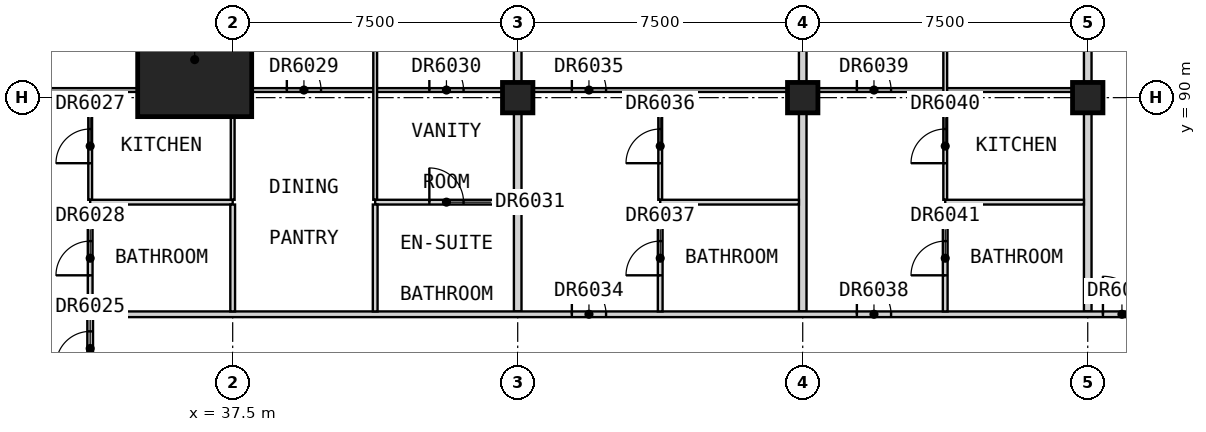
"""IFC4 building model, lengths in metres.
Left out: names, types, materials, properties, quantities, classifications, styles, units other than length and angle.
Written with IfcOpenShell. Run it as: python <this file> out.ifc"""

import sys

from ifc_helpers import new_model, si_unit, direction, frame, frame_2d, origin, origin_2d, place, context, subcontext, project, spatial, rectangle, extrude, element, fill, save


model = new_model("IFC4")
c1 = context("Model", 3, precision=1e-05, world=origin(), true_north=direction((0.0, 1.0)))
c2 = subcontext(c1, "Body", "Model", "MODEL_VIEW")
j1 = project(units=[si_unit("LENGTHUNIT", "METRE"), si_unit("PLANEANGLEUNIT", "RADIAN")], contexts=[c1])
p1 = place(None, origin())
s1 = spatial("IfcSite", under=j1, at=p1, CompositionType="ELEMENT")
p2 = place(p1, origin())
s2 = spatial("IfcBuilding", under=s1, at=p2, CompositionType="ELEMENT")
p3 = place(p2, frame((0.0, 0.0, 254.7)))
s3 = spatial("IfcBuildingStorey", under=s2, at=p3, CompositionType="ELEMENT", Elevation=254.7)
for number, where, z_axis, x_axis in (
    (1, (45.0, 90.0, 0.0), (0.0, 0.0, 1.0), (1.0, 0.0, 0.0)),
    (2, (52.5, 90.0, 0.0), (0.0, 0.0, 1.0), (1.0, 0.0, 0.0)),
    (3, (60.0, 90.0, 0.0), (0.0, 0.0, 1.0), (1.0, 0.0, 0.0)),
):
    element("IfcColumn", number, at=place(p3, frame(where, z_axis=z_axis, x_axis=x_axis)), inside=s3, PredefinedType="COLUMN", context=c2, shape_type="SweptSolid", body=[
        extrude(rectangle(XDim=0.8, YDim=0.8, at=origin_2d()), origin(), (0.0, 0.0, 1.0), 3.5),
    ])
p4 = place(p3, frame((36.5, 91.0, 0.0), z_axis=(0.0, 0.0, 1.0), x_axis=(1.0, 0.0, 0.0)))
e4 = element("IfcColumn", 4, at=p4, inside=s3, PredefinedType="COLUMN", context=c2, shape_type="SweptSolid", body=[
    extrude(rectangle(XDim=3.0, YDim=3.0, at=origin_2d()), origin(), (0.0, 0.0, 1.0), 3.5),
])
for number, where, z_axis, x_axis in (
    (5, (45.0, 84.375, 0.0), (0.0, 0.0, 1.0), (0.0, 1.0, 0.0)),
    (6, (52.5, 84.375, 0.0), (0.0, 0.0, 1.0), (0.0, 1.0, 0.0)),
    (7, (60.0, 84.375, 0.0), (0.0, 0.0, 1.0), (0.0, 1.0, 0.0)),
):
    element("IfcWall", number, at=place(p3, frame(where, z_axis=z_axis, x_axis=x_axis)), inside=s3, PredefinedType="PARTITIONING", context=c2, shape_type="SweptSolid", body=[
        extrude(rectangle(XDim=13.125, YDim=0.2, at=frame_2d((6.562, 0.0))), origin(), (0.0, 0.0, 1.0), 3.1),
    ])
p5 = place(p3, frame((33.75, 84.3, 0.0), z_axis=(0.0, 0.0, 1.0), x_axis=(1.0, 0.0, 0.0)))
e8 = element("IfcWall", 8, at=p5, inside=s3, PredefinedType="PARTITIONING", context=c2, shape_type="SweptSolid", body=[
    extrude(rectangle(XDim=28.05, YDim=0.15, at=frame_2d((14.025, 0.0))), origin(), (0.0, 0.0, 1.0), 3.1),
])
p6 = place(p5, frame((12.675, 0.0, 0.0)))
e9 = element("IfcOpeningElement", 9, at=p6, cuts=e8, PredefinedType="OPENING", context=c2, shape_type="SweptSolid", body=[
    extrude(rectangle(XDim=0.9, YDim=2.1, at=frame_2d((0.45, 1.05))), frame((0.0, 0.085, 0.0), z_axis=(0.0, -1.0, 0.0), x_axis=(1.0, 0.0, 0.0)), (0.0, 0.0, 1.0), 0.17),
])
p7 = place(p5, frame((20.175, 0.0, 0.0)))
e10 = element("IfcOpeningElement", 10, at=p7, cuts=e8, PredefinedType="OPENING", context=c2, shape_type="SweptSolid", body=[
    extrude(rectangle(XDim=0.9, YDim=2.1, at=frame_2d((0.45, 1.05))), frame((0.0, 0.085, 0.0), z_axis=(0.0, -1.0, 0.0), x_axis=(1.0, 0.0, 0.0)), (0.0, 0.0, 1.0), 0.17),
])
p8 = place(p5, frame((26.65, 0.0, 0.0)))
e11 = element("IfcOpeningElement", 11, at=p8, cuts=e8, PredefinedType="OPENING", context=c2, shape_type="SweptSolid", body=[
    extrude(rectangle(XDim=1.0, YDim=2.1, at=frame_2d((0.5, 1.05))), frame((0.0, 0.085, 0.0), z_axis=(0.0, -1.0, 0.0), x_axis=(1.0, 0.0, 0.0)), (0.0, 0.0, 1.0), 0.17),
])
p9 = place(p3, frame((33.75, 82.5, 0.0), z_axis=(0.0, 0.0, 1.0), x_axis=(0.0, 1.0, 0.0)))
e12 = element("IfcWall", 12, at=p9, inside=s3, PredefinedType="PARTITIONING", context=c2, shape_type="SweptSolid", body=[
    extrude(rectangle(XDim=1.725, YDim=0.15, at=frame_2d((0.863, 0.0))), origin(), (0.0, 0.0, 1.0), 3.1),
])
p10 = place(p9, frame((0.45, 0.0, 0.0)))
e13 = element("IfcOpeningElement", 13, at=p10, cuts=e12, PredefinedType="OPENING", context=c2, shape_type="SweptSolid", body=[
    extrude(rectangle(XDim=0.9, YDim=2.1, at=frame_2d((0.45, 1.05))), frame((0.0, 0.085, 0.0), z_axis=(0.0, -1.0, 0.0), x_axis=(1.0, 0.0, 0.0)), (0.0, 0.0, 1.0), 0.17),
])
p11 = place(p3, frame((30.0, 90.2, 0.0), z_axis=(0.0, 0.0, 1.0), x_axis=(1.0, 0.0, 0.0)))
e14 = element("IfcWall", 14, at=p11, inside=s3, PredefinedType="PARTITIONING", context=c2, shape_type="SweptSolid", body=[
    extrude(rectangle(XDim=29.9, YDim=0.1, at=frame_2d((14.95, 0.0))), origin(), (0.0, 0.0, 1.0), 2.75),
])
p12 = place(p11, frame((1.425, 0.0, 0.0)))
e15 = element("IfcOpeningElement", 15, at=p12, cuts=e14, PredefinedType="OPENING", context=c2, shape_type="SweptSolid", body=[
    extrude(rectangle(XDim=0.9, YDim=2.1, at=frame_2d((0.45, 1.05))), frame((0.0, 0.06, 0.0), z_axis=(0.0, -1.0, 0.0), x_axis=(1.0, 0.0, 0.0)), (0.0, 0.0, 1.0), 0.12),
])
p13 = place(p11, frame((8.925, 0.0, 0.0)))
e16 = element("IfcOpeningElement", 16, at=p13, cuts=e14, PredefinedType="OPENING", context=c2, shape_type="SweptSolid", body=[
    extrude(rectangle(XDim=0.9, YDim=2.1, at=frame_2d((0.45, 1.05))), frame((0.0, 0.06, 0.0), z_axis=(0.0, -1.0, 0.0), x_axis=(1.0, 0.0, 0.0)), (0.0, 0.0, 1.0), 0.12),
])
p14 = place(p11, frame((12.675, 0.0, 0.0)))
e17 = element("IfcOpeningElement", 17, at=p14, cuts=e14, PredefinedType="OPENING", context=c2, shape_type="SweptSolid", body=[
    extrude(rectangle(XDim=0.9, YDim=2.1, at=frame_2d((0.45, 1.05))), frame((0.0, 0.06, 0.0), z_axis=(0.0, -1.0, 0.0), x_axis=(1.0, 0.0, 0.0)), (0.0, 0.0, 1.0), 0.12),
])
p15 = place(p11, frame((16.425, 0.0, 0.0)))
e18 = element("IfcOpeningElement", 18, at=p15, cuts=e14, PredefinedType="OPENING", context=c2, shape_type="SweptSolid", body=[
    extrude(rectangle(XDim=0.9, YDim=2.1, at=frame_2d((0.45, 1.05))), frame((0.0, 0.06, 0.0), z_axis=(0.0, -1.0, 0.0), x_axis=(1.0, 0.0, 0.0)), (0.0, 0.0, 1.0), 0.12),
])
p16 = place(p11, frame((23.925, 0.0, 0.0)))
e19 = element("IfcOpeningElement", 19, at=p16, cuts=e14, PredefinedType="OPENING", context=c2, shape_type="SweptSolid", body=[
    extrude(rectangle(XDim=0.9, YDim=2.1, at=frame_2d((0.45, 1.05))), frame((0.0, 0.06, 0.0), z_axis=(0.0, -1.0, 0.0), x_axis=(1.0, 0.0, 0.0)), (0.0, 0.0, 1.0), 0.12),
])
p17 = place(p3, frame((33.75, 87.312, 0.0), z_axis=(0.0, 0.0, 1.0), x_axis=(0.0, 1.0, 0.0)))
e20 = element("IfcWall", 20, at=p17, inside=s3, PredefinedType="PARTITIONING", context=c2, shape_type="SweptSolid", body=[
    extrude(rectangle(XDim=2.837, YDim=0.1, at=frame_2d((1.419, 0.0))), origin(), (0.0, 0.0, 1.0), 3.1),
])
p18 = place(p17, frame((0.962, 0.0, 0.0)))
e21 = element("IfcOpeningElement", 21, at=p18, cuts=e20, PredefinedType="OPENING", context=c2, shape_type="SweptSolid", body=[
    extrude(rectangle(XDim=0.9, YDim=2.1, at=frame_2d((0.45, 1.05))), frame((0.0, 0.06, 0.0), z_axis=(0.0, -1.0, 0.0), x_axis=(1.0, 0.0, 0.0)), (0.0, 0.0, 1.0), 0.12),
])
p19 = place(p3, frame((37.5, 87.312, 0.0), z_axis=(0.0, 0.0, 1.0), x_axis=(0.0, 1.0, 0.0)))
e22 = element("IfcWall", 22, at=p19, inside=s3, PredefinedType="PARTITIONING", context=c2, shape_type="SweptSolid", body=[
    extrude(rectangle(XDim=10.188, YDim=0.1, at=frame_2d((5.094, 0.0))), origin(), (0.0, 0.0, 1.0), 2.75),
])
p20 = place(p19, frame((6.087, 0.0, 0.0)))
e23 = element("IfcOpeningElement", 23, at=p20, cuts=e22, PredefinedType="OPENING", context=c2, shape_type="SweptSolid", body=[
    extrude(rectangle(XDim=0.9, YDim=2.1, at=frame_2d((0.45, 1.05))), frame((0.0, 0.06, 0.0), z_axis=(0.0, -1.0, 0.0), x_axis=(1.0, 0.0, 0.0)), (0.0, 0.0, 1.0), 0.12),
])
p21 = place(p3, frame((41.25, 87.312, 0.0), z_axis=(0.0, 0.0, 1.0), x_axis=(0.0, 1.0, 0.0)))
e24 = element("IfcWall", 24, at=p21, inside=s3, PredefinedType="PARTITIONING", context=c2, shape_type="SweptSolid", body=[
    extrude(rectangle(XDim=9.377, YDim=0.1, at=frame_2d((4.689, 0.0))), origin(), (0.0, 0.0, 1.0), 3.1),
])
p22 = place(p21, frame((6.087, 0.0, 0.0)))
e25 = element("IfcOpeningElement", 25, at=p22, cuts=e24, PredefinedType="OPENING", context=c2, shape_type="SweptSolid", body=[
    extrude(rectangle(XDim=0.9, YDim=2.1, at=frame_2d((0.45, 1.05))), frame((0.0, 0.06, 0.0), z_axis=(0.0, -1.0, 0.0), x_axis=(1.0, 0.0, 0.0)), (0.0, 0.0, 1.0), 0.12),
])
p23 = place(p3, frame((48.75, 87.312, 0.0), z_axis=(0.0, 0.0, 1.0), x_axis=(0.0, 1.0, 0.0)))
e26 = element("IfcWall", 26, at=p23, inside=s3, PredefinedType="PARTITIONING", context=c2, shape_type="SweptSolid", body=[
    extrude(rectangle(XDim=2.837, YDim=0.1, at=frame_2d((1.419, 0.0))), origin(), (0.0, 0.0, 1.0), 3.1),
])
p24 = place(p23, frame((0.962, 0.0, 0.0)))
e27 = element("IfcOpeningElement", 27, at=p24, cuts=e26, PredefinedType="OPENING", context=c2, shape_type="SweptSolid", body=[
    extrude(rectangle(XDim=0.9, YDim=2.1, at=frame_2d((0.45, 1.05))), frame((0.0, 0.06, 0.0), z_axis=(0.0, -1.0, 0.0), x_axis=(1.0, 0.0, 0.0)), (0.0, 0.0, 1.0), 0.12),
])
p25 = place(p3, frame((56.25, 87.312, 0.0), z_axis=(0.0, 0.0, 1.0), x_axis=(0.0, 1.0, 0.0)))
e28 = element("IfcWall", 28, at=p25, inside=s3, PredefinedType="PARTITIONING", context=c2, shape_type="SweptSolid", body=[
    extrude(rectangle(XDim=9.377, YDim=0.1, at=frame_2d((4.689, 0.0))), origin(), (0.0, 0.0, 1.0), 3.1),
])
p26 = place(p25, frame((0.962, 0.0, 0.0)))
e29 = element("IfcOpeningElement", 29, at=p26, cuts=e28, PredefinedType="OPENING", context=c2, shape_type="SweptSolid", body=[
    extrude(rectangle(XDim=0.9, YDim=2.1, at=frame_2d((0.45, 1.05))), frame((0.0, 0.06, 0.0), z_axis=(0.0, -1.0, 0.0), x_axis=(1.0, 0.0, 0.0)), (0.0, 0.0, 1.0), 0.12),
])
p27 = place(p25, frame((6.087, 0.0, 0.0)))
e30 = element("IfcOpeningElement", 30, at=p27, cuts=e28, PredefinedType="OPENING", context=c2, shape_type="SweptSolid", body=[
    extrude(rectangle(XDim=0.9, YDim=2.1, at=frame_2d((0.45, 1.05))), frame((0.0, 0.06, 0.0), z_axis=(0.0, -1.0, 0.0), x_axis=(1.0, 0.0, 0.0)), (0.0, 0.0, 1.0), 0.12),
])
p28 = place(p3, frame((33.75, 87.25, 0.0), z_axis=(0.0, 0.0, 1.0), x_axis=(1.0, 0.0, 0.0)))
e31 = element("IfcWall", 31, at=p28, inside=s3, PredefinedType="PARTITIONING", context=c2, shape_type="SweptSolid", body=[
    extrude(rectangle(XDim=3.75, YDim=0.125, at=frame_2d((1.875, 0.0))), origin(), (0.0, 0.0, 1.0), 3.1),
])
p29 = place(p3, frame((41.25, 87.25, 0.0), z_axis=(0.0, 0.0, 1.0), x_axis=(1.0, 0.0, 0.0)))
e32 = element("IfcWall", 32, at=p29, inside=s3, PredefinedType="PARTITIONING", context=c2, shape_type="SweptSolid", body=[
    extrude(rectangle(XDim=3.65, YDim=0.125, at=frame_2d((1.825, 0.0))), origin(), (0.0, 0.0, 1.0), 3.1),
])
p30 = place(p29, frame((1.425, 0.0, 0.0)))
e33 = element("IfcOpeningElement", 33, at=p30, cuts=e32, PredefinedType="OPENING", context=c2, shape_type="SweptSolid", body=[
    extrude(rectangle(XDim=0.9, YDim=2.1, at=frame_2d((0.45, 1.05))), frame((0.0, 0.073, 0.0), z_axis=(0.0, -1.0, 0.0), x_axis=(1.0, 0.0, 0.0)), (0.0, 0.0, 1.0), 0.145),
])
for number, where, z_axis, x_axis in (
    (34, (48.75, 87.25, 0.0), (0.0, 0.0, 1.0), (1.0, 0.0, 0.0)),
    (35, (56.25, 87.25, 0.0), (0.0, 0.0, 1.0), (1.0, 0.0, 0.0)),
):
    element("IfcWall", number, at=place(p3, frame(where, z_axis=z_axis, x_axis=x_axis)), inside=s3, PredefinedType="PARTITIONING", context=c2, shape_type="SweptSolid", body=[
        extrude(rectangle(XDim=3.65, YDim=0.125, at=frame_2d((1.825, 0.0))), origin(), (0.0, 0.0, 1.0), 3.1),
    ])
p31 = place(p3, frame((33.75, 84.375, 0.0), z_axis=(0.0, 0.0, 1.0), x_axis=(0.0, 1.0, 0.0)))
e36 = element("IfcWall", 36, at=p31, inside=s3, PredefinedType="PARTITIONING", context=c2, shape_type="SweptSolid", body=[
    extrude(rectangle(XDim=2.812, YDim=0.125, at=frame_2d((1.406, 0.0))), origin(), (0.0, 0.0, 1.0), 3.1),
])
p32 = place(p31, frame((0.95, 0.0, 0.0)))
e37 = element("IfcOpeningElement", 37, at=p32, cuts=e36, PredefinedType="OPENING", context=c2, shape_type="SweptSolid", body=[
    extrude(rectangle(XDim=0.9, YDim=2.1, at=frame_2d((0.45, 1.05))), frame((0.0, 0.073, 0.0), z_axis=(0.0, -1.0, 0.0), x_axis=(1.0, 0.0, 0.0)), (0.0, 0.0, 1.0), 0.145),
])
for number, where, z_axis, x_axis in (
    (38, (37.5, 84.375, 0.0), (0.0, 0.0, 1.0), (0.0, 1.0, 0.0)),
    (39, (41.25, 84.375, 0.0), (0.0, 0.0, 1.0), (0.0, 1.0, 0.0)),
):
    element("IfcWall", number, at=place(p3, frame(where, z_axis=z_axis, x_axis=x_axis)), inside=s3, PredefinedType="PARTITIONING", context=c2, shape_type="SweptSolid", body=[
        extrude(rectangle(XDim=2.812, YDim=0.125, at=frame_2d((1.406, 0.0))), origin(), (0.0, 0.0, 1.0), 3.1),
    ])
p33 = place(p3, frame((48.75, 84.375, 0.0), z_axis=(0.0, 0.0, 1.0), x_axis=(0.0, 1.0, 0.0)))
e40 = element("IfcWall", 40, at=p33, inside=s3, PredefinedType="PARTITIONING", context=c2, shape_type="SweptSolid", body=[
    extrude(rectangle(XDim=2.812, YDim=0.125, at=frame_2d((1.406, 0.0))), origin(), (0.0, 0.0, 1.0), 3.1),
])
p34 = place(p33, frame((0.95, 0.0, 0.0)))
e41 = element("IfcOpeningElement", 41, at=p34, cuts=e40, PredefinedType="OPENING", context=c2, shape_type="SweptSolid", body=[
    extrude(rectangle(XDim=0.9, YDim=2.1, at=frame_2d((0.45, 1.05))), frame((0.0, 0.073, 0.0), z_axis=(0.0, -1.0, 0.0), x_axis=(1.0, 0.0, 0.0)), (0.0, 0.0, 1.0), 0.145),
])
p35 = place(p3, frame((56.25, 84.375, 0.0), z_axis=(0.0, 0.0, 1.0), x_axis=(0.0, 1.0, 0.0)))
e42 = element("IfcWall", 42, at=p35, inside=s3, PredefinedType="PARTITIONING", context=c2, shape_type="SweptSolid", body=[
    extrude(rectangle(XDim=2.812, YDim=0.125, at=frame_2d((1.406, 0.0))), origin(), (0.0, 0.0, 1.0), 3.1),
])
p36 = place(p35, frame((0.95, 0.0, 0.0)))
e43 = element("IfcOpeningElement", 43, at=p36, cuts=e42, PredefinedType="OPENING", context=c2, shape_type="SweptSolid", body=[
    extrude(rectangle(XDim=0.9, YDim=2.1, at=frame_2d((0.45, 1.05))), frame((0.0, 0.073, 0.0), z_axis=(0.0, -1.0, 0.0), x_axis=(1.0, 0.0, 0.0)), (0.0, 0.0, 1.0), 0.145),
])
p37 = place(p10, origin())
e44 = element("IfcDoor", 44, at=p37, inside=s3, OperationType="SINGLE_SWING_LEFT", PredefinedType="DOOR", context=c2, shape_type="SweptSolid", body=[
    extrude(rectangle(XDim=0.9, YDim=2.1, at=frame_2d((0.45, 1.05))), frame((0.0, 0.025, 0.0), z_axis=(0.0, -1.0, 0.0), x_axis=(1.0, 0.0, 0.0)), (0.0, 0.0, 1.0), 0.05),
])
fill(e13, e44)
p38 = place(p18, origin())
e45 = element("IfcDoor", 45, at=p38, inside=s3, OperationType="SINGLE_SWING_RIGHT", PredefinedType="DOOR", context=c2, shape_type="SweptSolid", body=[
    extrude(rectangle(XDim=0.9, YDim=2.1, at=frame_2d((0.45, 1.05))), frame((0.0, 0.025, 0.0), z_axis=(0.0, -1.0, 0.0), x_axis=(1.0, 0.0, 0.0)), (0.0, 0.0, 1.0), 0.05),
])
fill(e21, e45)
p39 = place(p32, origin())
e46 = element("IfcDoor", 46, at=p39, inside=s3, OperationType="SINGLE_SWING_RIGHT", PredefinedType="DOOR", context=c2, shape_type="SweptSolid", body=[
    extrude(rectangle(XDim=0.9, YDim=2.1, at=frame_2d((0.45, 1.05))), frame((0.0, 0.025, 0.0), z_axis=(0.0, -1.0, 0.0), x_axis=(1.0, 0.0, 0.0)), (0.0, 0.0, 1.0), 0.05),
])
fill(e37, e46)
p40 = place(p13, origin())
e47 = element("IfcDoor", 47, at=p40, inside=s3, OperationType="SINGLE_SWING_RIGHT", PredefinedType="DOOR", context=c2, shape_type="SweptSolid", body=[
    extrude(rectangle(XDim=0.9, YDim=2.1, at=frame_2d((0.45, 1.05))), frame((0.0, 0.025, 0.0), z_axis=(0.0, -1.0, 0.0), x_axis=(1.0, 0.0, 0.0)), (0.0, 0.0, 1.0), 0.05),
])
fill(e16, e47)
p41 = place(p14, origin())
e48 = element("IfcDoor", 48, at=p41, inside=s3, OperationType="SINGLE_SWING_RIGHT", PredefinedType="DOOR", context=c2, shape_type="SweptSolid", body=[
    extrude(rectangle(XDim=0.9, YDim=2.1, at=frame_2d((0.45, 1.05))), frame((0.0, 0.025, 0.0), z_axis=(0.0, -1.0, 0.0), x_axis=(1.0, 0.0, 0.0)), (0.0, 0.0, 1.0), 0.05),
])
fill(e17, e48)
p42 = place(p30, origin())
e49 = element("IfcDoor", 49, at=p42, inside=s3, OperationType="SINGLE_SWING_RIGHT", PredefinedType="DOOR", context=c2, shape_type="SweptSolid", body=[
    extrude(rectangle(XDim=0.9, YDim=2.1, at=frame_2d((0.45, 1.05))), frame((0.0, 0.025, 0.0), z_axis=(0.0, -1.0, 0.0), x_axis=(1.0, 0.0, 0.0)), (0.0, 0.0, 1.0), 0.05),
])
fill(e33, e49)
p43 = place(p6, origin())
e50 = element("IfcDoor", 50, at=p43, inside=s3, OperationType="SINGLE_SWING_LEFT", PredefinedType="DOOR", context=c2, shape_type="SweptSolid", body=[
    extrude(rectangle(XDim=0.9, YDim=2.1, at=frame_2d((0.45, 1.05))), frame((0.0, 0.025, 0.0), z_axis=(0.0, -1.0, 0.0), x_axis=(1.0, 0.0, 0.0)), (0.0, 0.0, 1.0), 0.05),
])
fill(e9, e50)
p44 = place(p15, origin())
e51 = element("IfcDoor", 51, at=p44, inside=s3, OperationType="SINGLE_SWING_RIGHT", PredefinedType="DOOR", context=c2, shape_type="SweptSolid", body=[
    extrude(rectangle(XDim=0.9, YDim=2.1, at=frame_2d((0.45, 1.05))), frame((0.0, 0.025, 0.0), z_axis=(0.0, -1.0, 0.0), x_axis=(1.0, 0.0, 0.0)), (0.0, 0.0, 1.0), 0.05),
])
fill(e18, e51)
p45 = place(p24, origin())
e52 = element("IfcDoor", 52, at=p45, inside=s3, OperationType="SINGLE_SWING_RIGHT", PredefinedType="DOOR", context=c2, shape_type="SweptSolid", body=[
    extrude(rectangle(XDim=0.9, YDim=2.1, at=frame_2d((0.45, 1.05))), frame((0.0, 0.025, 0.0), z_axis=(0.0, -1.0, 0.0), x_axis=(1.0, 0.0, 0.0)), (0.0, 0.0, 1.0), 0.05),
])
fill(e27, e52)
p46 = place(p34, origin())
e53 = element("IfcDoor", 53, at=p46, inside=s3, OperationType="SINGLE_SWING_RIGHT", PredefinedType="DOOR", context=c2, shape_type="SweptSolid", body=[
    extrude(rectangle(XDim=0.9, YDim=2.1, at=frame_2d((0.45, 1.05))), frame((0.0, 0.025, 0.0), z_axis=(0.0, -1.0, 0.0), x_axis=(1.0, 0.0, 0.0)), (0.0, 0.0, 1.0), 0.05),
])
fill(e41, e53)
p47 = place(p7, origin())
e54 = element("IfcDoor", 54, at=p47, inside=s3, OperationType="SINGLE_SWING_LEFT", PredefinedType="DOOR", context=c2, shape_type="SweptSolid", body=[
    extrude(rectangle(XDim=0.9, YDim=2.1, at=frame_2d((0.45, 1.05))), frame((0.0, 0.025, 0.0), z_axis=(0.0, -1.0, 0.0), x_axis=(1.0, 0.0, 0.0)), (0.0, 0.0, 1.0), 0.05),
])
fill(e10, e54)
p48 = place(p16, origin())
e55 = element("IfcDoor", 55, at=p48, inside=s3, OperationType="SINGLE_SWING_RIGHT", PredefinedType="DOOR", context=c2, shape_type="SweptSolid", body=[
    extrude(rectangle(XDim=0.9, YDim=2.1, at=frame_2d((0.45, 1.05))), frame((0.0, 0.025, 0.0), z_axis=(0.0, -1.0, 0.0), x_axis=(1.0, 0.0, 0.0)), (0.0, 0.0, 1.0), 0.05),
])
fill(e19, e55)
p49 = place(p26, origin())
e56 = element("IfcDoor", 56, at=p49, inside=s3, OperationType="SINGLE_SWING_RIGHT", PredefinedType="DOOR", context=c2, shape_type="SweptSolid", body=[
    extrude(rectangle(XDim=0.9, YDim=2.1, at=frame_2d((0.45, 1.05))), frame((0.0, 0.025, 0.0), z_axis=(0.0, -1.0, 0.0), x_axis=(1.0, 0.0, 0.0)), (0.0, 0.0, 1.0), 0.05),
])
fill(e29, e56)
p50 = place(p36, origin())
e57 = element("IfcDoor", 57, at=p50, inside=s3, OperationType="SINGLE_SWING_RIGHT", PredefinedType="DOOR", context=c2, shape_type="SweptSolid", body=[
    extrude(rectangle(XDim=0.9, YDim=2.1, at=frame_2d((0.45, 1.05))), frame((0.0, 0.025, 0.0), z_axis=(0.0, -1.0, 0.0), x_axis=(1.0, 0.0, 0.0)), (0.0, 0.0, 1.0), 0.05),
])
fill(e43, e57)
p51 = place(p8, origin())
e58 = element("IfcDoor", 58, at=p51, inside=s3, OperationType="SINGLE_SWING_LEFT", PredefinedType="DOOR", context=c2, shape_type="SweptSolid", body=[
    extrude(rectangle(XDim=1.0, YDim=2.1, at=frame_2d((0.5, 1.05))), frame((0.0, 0.025, 0.0), z_axis=(0.0, -1.0, 0.0), x_axis=(1.0, 0.0, 0.0)), (0.0, 0.0, 1.0), 0.05),
])
fill(e11, e58)
save(model, sys.argv[1])
